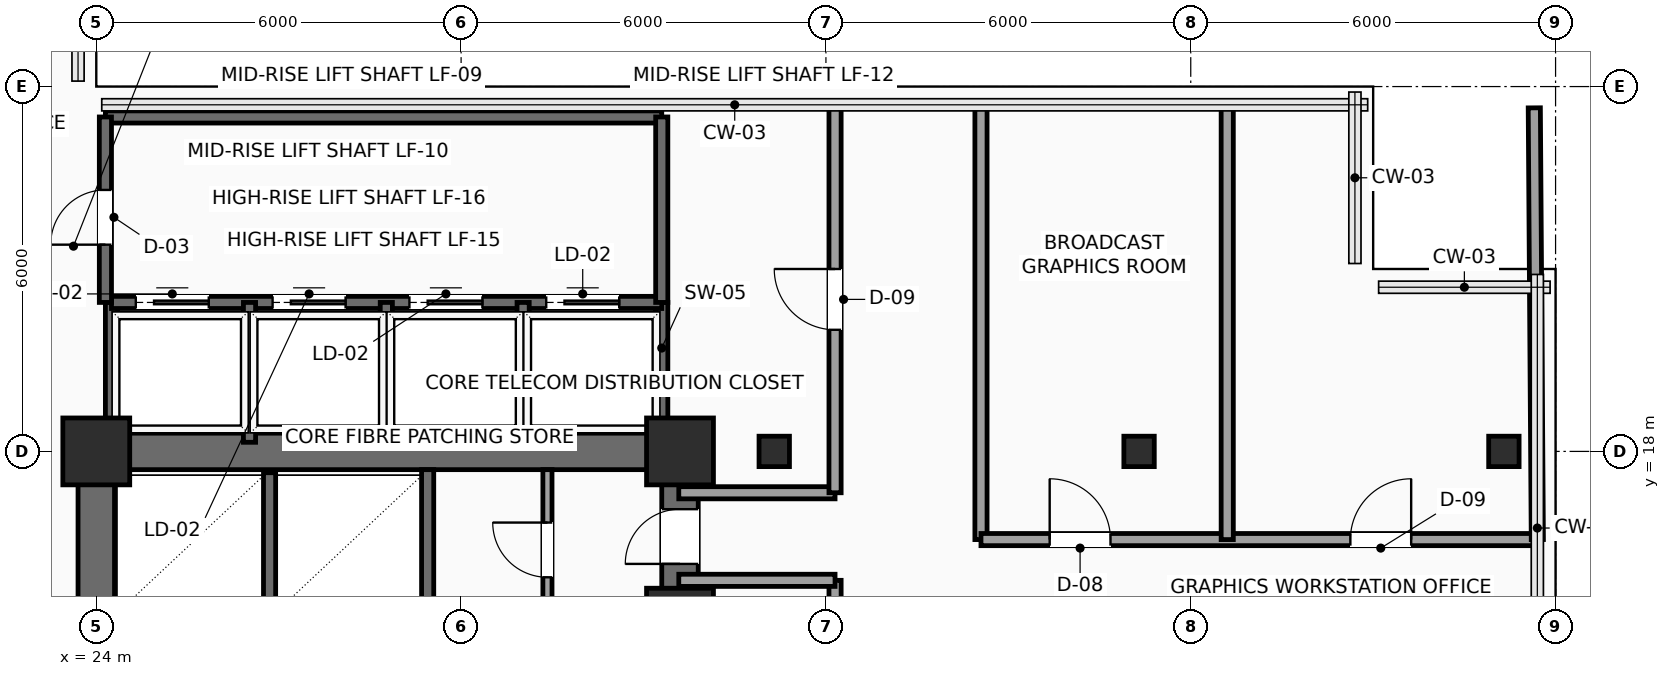
"""IFC4 building model, lengths in metres.
Left out: names, types, materials, properties, quantities, classifications, styles, units other than length and angle.
Written with IfcOpenShell. Run it as: python <this file> out.ifc"""

import sys

from ifc_helpers import new_model, si_unit, direction, frame, frame_2d, origin, origin_2d, place, context, subcontext, project, spatial, rectangle, hollow_rectangle, extrude, element, fill, save


model = new_model("IFC4")
c1 = context("Model", 3, precision=1e-05, world=origin(), true_north=direction((0.0, 1.0)))
c2 = subcontext(c1, "Body", "Model", "MODEL_VIEW")
j1 = project(units=[si_unit("LENGTHUNIT", "METRE"), si_unit("PLANEANGLEUNIT", "RADIAN")], contexts=[c1])
p1 = place(None, origin())
s1 = spatial("IfcSite", under=j1, at=p1, CompositionType="ELEMENT")
p2 = place(p1, origin())
s2 = spatial("IfcBuilding", under=s1, at=p2, CompositionType="ELEMENT")
p3 = place(p2, frame((0.0, 0.0, 123.15)))
s3 = spatial("IfcBuildingStorey", under=s2, at=p3, CompositionType="ELEMENT", Elevation=123.15)
for number, where, z_axis, x_axis in (
    (1, (24.0, 18.0, 0.0), (0.0, 0.0, 1.0), (1.0, 0.0, 0.0)),
    (2, (33.6, 15.2, 0.0), (0.0, 0.0, 1.0), (1.0, 0.0, 0.0)),
    (3, (33.6, 18.0, 0.0), (0.0, 0.0, 1.0), (1.0, 0.0, 0.0)),
):
    element("IfcColumn", number, at=place(p3, frame(where, z_axis=z_axis, x_axis=x_axis)), inside=s3, PredefinedType="COLUMN", context=c2, shape_type="SweptSolid", body=[
        extrude(rectangle(XDim=1.1, YDim=1.1, at=origin_2d()), origin(), (0.0, 0.0, 1.0), 3.75),
    ])
for number, where, z_axis, x_axis in (
    (4, (35.15, 18.0, 0.0), (0.0, 0.0, 1.0), (1.0, 0.0, 0.0)),
    (5, (41.15, 18.0, 0.0), (0.0, 0.0, 1.0), (1.0, 0.0, 0.0)),
    (6, (47.15, 18.0, 0.0), (0.0, 0.0, 1.0), (1.0, 0.0, 0.0)),
):
    element("IfcColumn", number, at=place(p3, frame(where, z_axis=z_axis, x_axis=x_axis)), inside=s3, PredefinedType="COLUMN", context=c2, shape_type="SweptSolid", body=[
        extrude(hollow_rectangle(XDim=0.5, YDim=0.5, WallThickness=0.025, InnerFilletRadius=0.025, OuterFilletRadius=0.04, at=origin_2d()), origin(), (0.0, 0.0, 1.0), 3.75),
    ])
p4 = place(p3, frame((24.0, 18.0, 0.0), z_axis=(0.0, 0.0, 1.0), x_axis=(1.0, 0.0, 0.0)))
e7 = element("IfcWall", 7, at=p4, inside=s3, PredefinedType="SHEAR", context=c2, shape_type="SweptSolid", body=[
    extrude(rectangle(XDim=9.6, YDim=0.6, at=frame_2d((4.8, 0.0))), origin(), (0.0, 0.0, 1.0), 3.525),
])
p5 = place(p3, frame((24.0, 6.0, 0.0), z_axis=(0.0, 0.0, 1.0), x_axis=(0.0, 1.0, 0.0)))
e8 = element("IfcWall", 8, at=p5, inside=s3, PredefinedType="SHEAR", context=c2, shape_type="SweptSolid", body=[
    extrude(rectangle(XDim=12.0, YDim=0.6, at=frame_2d((6.0, 0.0))), origin(), (0.0, 0.0, 1.0), 3.525),
])
p6 = place(p5, frame((7.15, 0.0, 0.0)))
e9 = element("IfcOpeningElement", 9, at=p6, cuts=e8, PredefinedType="OPENING", context=c2, shape_type="SweptSolid", body=[
    extrude(rectangle(XDim=1.6, YDim=2.3, at=frame_2d((0.8, 1.15))), frame((0.0, 0.31, 0.0), z_axis=(0.0, -1.0, 0.0), x_axis=(1.0, 0.0, 0.0)), (0.0, 0.0, 1.0), 0.62),
])
p7 = place(p3, frame((33.6, 6.0, 0.0), z_axis=(0.0, 0.0, 1.0), x_axis=(0.0, 1.0, 0.0)))
e10 = element("IfcWall", 10, at=p7, inside=s3, PredefinedType="SHEAR", context=c2, shape_type="SweptSolid", body=[
    extrude(rectangle(XDim=12.0, YDim=0.6, at=frame_2d((6.0, 0.0))), origin(), (0.0, 0.0, 1.0), 3.525),
])
p8 = place(p7, frame((10.15, 0.0, 0.0)))
e11 = element("IfcOpeningElement", 11, at=p8, cuts=e10, PredefinedType="OPENING", context=c2, shape_type="SweptSolid", body=[
    extrude(rectangle(XDim=0.9, YDim=2.15, at=frame_2d((0.45, 1.075))), frame((0.0, 0.31, 0.0), z_axis=(0.0, -1.0, 0.0), x_axis=(1.0, 0.0, 0.0)), (0.0, 0.0, 1.0), 0.62),
])
p9 = place(p3, frame((26.85, 15.25, 0.0), z_axis=(0.0, 0.0, 1.0), x_axis=(0.0, 1.0, 0.0)))
e12 = element("IfcWall", 12, at=p9, inside=s3, PredefinedType="SHEAR", context=c2, shape_type="SweptSolid", body=[
    extrude(rectangle(XDim=2.4, YDim=0.2, at=frame_2d((1.2, 0.0))), origin(), (0.0, 0.0, 1.0), 3.525),
])
p10 = place(p3, frame((29.45, 15.25, 0.0), z_axis=(0.0, 0.0, 1.0), x_axis=(0.0, 1.0, 0.0)))
e13 = element("IfcWall", 13, at=p10, inside=s3, PredefinedType="SHEAR", context=c2, shape_type="SweptSolid", body=[
    extrude(rectangle(XDim=2.45, YDim=0.2, at=frame_2d((1.225, 0.0))), origin(), (0.0, 0.0, 1.0), 3.525),
])
p11 = place(p3, frame((31.42, 15.28, 0.0), z_axis=(0.0, 0.0, 1.0), x_axis=(0.0, 1.0, 0.0)))
e14 = element("IfcWall", 14, at=p11, inside=s3, PredefinedType="PARTITIONING", context=c2, shape_type="SweptSolid", body=[
    extrude(rectangle(XDim=2.42, YDim=0.15, at=frame_2d((1.21, 0.0))), origin(), (0.0, 0.0, 1.0), 3.525),
])
p12 = place(p11, frame((0.65, 0.0, 0.0)))
e15 = element("IfcOpeningElement", 15, at=p12, cuts=e14, PredefinedType="OPENING", context=c2, shape_type="SweptSolid", body=[
    extrude(rectangle(XDim=0.9, YDim=2.15, at=frame_2d((0.45, 1.075))), frame((0.0, 0.085, 0.0), z_axis=(0.0, -1.0, 0.0), x_axis=(1.0, 0.0, 0.0)), (0.0, 0.0, 1.0), 0.17),
])
for number, where, z_axis, x_axis in (
    (16, (33.3, 18.1, 0.0), (0.0, 0.0, 1.0), (0.0, 1.0, 0.0)),
    (17, (24.25, 18.1, 0.0), (0.0, 0.0, 1.0), (0.0, 1.0, 0.0)),
):
    element("IfcWall", number, at=place(p3, frame(where, z_axis=z_axis, x_axis=x_axis)), inside=s3, PredefinedType="SHEAR", context=c2, shape_type="SweptSolid", body=[
        extrude(rectangle(XDim=2.35, YDim=0.2, at=frame_2d((1.175, 0.0))), origin(), (0.0, 0.0, 1.0), 3.525),
    ])
p13 = place(p3, frame((24.25, 20.45, 0.0), z_axis=(0.0, 0.0, 1.0), x_axis=(1.0, 0.0, 0.0)))
e18 = element("IfcWall", 18, at=p13, inside=s3, PredefinedType="SHEAR", context=c2, shape_type="SweptSolid", body=[
    extrude(rectangle(XDim=9.05, YDim=0.2, at=frame_2d((4.525, 0.0))), origin(), (0.0, 0.0, 1.0), 3.525),
])
p14 = place(p13, frame((0.4, 0.0, 0.0)))
e19 = element("IfcOpeningElement", 19, at=p14, cuts=e18, PredefinedType="OPENING", context=c2, shape_type="SweptSolid", body=[
    extrude(rectangle(XDim=1.2, YDim=2.2, at=frame_2d((0.6, 1.1))), frame((0.0, 0.11, 0.0), z_axis=(0.0, -1.0, 0.0), x_axis=(1.0, 0.0, 0.0)), (0.0, 0.0, 1.0), 0.22),
])
p15 = place(p13, frame((2.65, 0.0, 0.0)))
e20 = element("IfcOpeningElement", 20, at=p15, cuts=e18, PredefinedType="OPENING", context=c2, shape_type="SweptSolid", body=[
    extrude(rectangle(XDim=1.2, YDim=2.2, at=frame_2d((0.6, 1.1))), frame((0.0, 0.11, 0.0), z_axis=(0.0, -1.0, 0.0), x_axis=(1.0, 0.0, 0.0)), (0.0, 0.0, 1.0), 0.22),
])
p16 = place(p13, frame((4.9, 0.0, 0.0)))
e21 = element("IfcOpeningElement", 21, at=p16, cuts=e18, PredefinedType="OPENING", context=c2, shape_type="SweptSolid", body=[
    extrude(rectangle(XDim=1.2, YDim=2.2, at=frame_2d((0.6, 1.1))), frame((0.0, 0.11, 0.0), z_axis=(0.0, -1.0, 0.0), x_axis=(1.0, 0.0, 0.0)), (0.0, 0.0, 1.0), 0.22),
])
p17 = place(p13, frame((7.15, 0.0, 0.0)))
e22 = element("IfcOpeningElement", 22, at=p17, cuts=e18, PredefinedType="OPENING", context=c2, shape_type="SweptSolid", body=[
    extrude(rectangle(XDim=1.2, YDim=2.2, at=frame_2d((0.6, 1.1))), frame((0.0, 0.11, 0.0), z_axis=(0.0, -1.0, 0.0), x_axis=(1.0, 0.0, 0.0)), (0.0, 0.0, 1.0), 0.22),
])
for number, where, z_axis, x_axis in (
    (23, (26.52, 18.15, 0.0), (0.0, 0.0, 1.0), (0.0, 1.0, 0.0)),
    (24, (28.77, 18.15, 0.0), (0.0, 0.0, 1.0), (0.0, 1.0, 0.0)),
    (25, (31.02, 18.15, 0.0), (0.0, 0.0, 1.0), (0.0, 1.0, 0.0)),
):
    element("IfcWall", number, at=place(p3, frame(where, z_axis=z_axis, x_axis=x_axis)), inside=s3, PredefinedType="SHEAR", context=c2, shape_type="SweptSolid", body=[
        extrude(rectangle(XDim=2.3, YDim=0.2, at=frame_2d((1.15, 0.0))), origin(), (0.0, 0.0, 1.0), 3.525),
    ])
p18 = place(p3, frame((24.15, 23.5, 0.0), z_axis=(0.0, 0.0, 1.0), x_axis=(1.0, 0.0, 0.0)))
e26 = element("IfcWall", 26, at=p18, inside=s3, PredefinedType="SHEAR", context=c2, shape_type="SweptSolid", body=[
    extrude(rectangle(XDim=9.15, YDim=0.2, at=frame_2d((4.575, 0.0))), origin(), (0.0, 0.0, 1.0), 3.525),
])
p19 = place(p3, frame((33.3, 20.45, 0.0), z_axis=(0.0, 0.0, 1.0), x_axis=(0.0, 1.0, 0.0)))
e27 = element("IfcWall", 27, at=p19, inside=s3, PredefinedType="SHEAR", context=c2, shape_type="SweptSolid", body=[
    extrude(rectangle(XDim=3.05, YDim=0.2, at=frame_2d((1.525, 0.0))), origin(), (0.0, 0.0, 1.0), 3.525),
])
p20 = place(p3, frame((24.15, 20.45, 0.0), z_axis=(0.0, 0.0, 1.0), x_axis=(0.0, 1.0, 0.0)))
e28 = element("IfcWall", 28, at=p20, inside=s3, PredefinedType="SHEAR", context=c2, shape_type="SweptSolid", body=[
    extrude(rectangle(XDim=3.05, YDim=0.2, at=frame_2d((1.525, 0.0))), origin(), (0.0, 0.0, 1.0), 3.525),
])
p21 = place(p20, frame((0.95, 0.0, 0.0)))
e29 = element("IfcOpeningElement", 29, at=p21, cuts=e28, PredefinedType="OPENING", context=c2, shape_type="SweptSolid", body=[
    extrude(rectangle(XDim=0.9, YDim=2.15, at=frame_2d((0.45, 1.075))), frame((0.0, 0.11, 0.0), z_axis=(0.0, -1.0, 0.0), x_axis=(1.0, 0.0, 0.0)), (0.0, 0.0, 1.0), 0.22),
])
p22 = place(p3, frame((36.15, 5.8, 0.0), z_axis=(0.0, 0.0, 1.0), x_axis=(0.0, 1.0, 0.0)))
e30 = element("IfcWall", 30, at=p22, inside=s3, PredefinedType="SOLIDWALL", context=c2, shape_type="SweptSolid", body=[
    extrude(rectangle(XDim=10.08, YDim=0.2, at=frame_2d((5.04, 0.0))), origin(), (0.0, 0.0, 1.0), 3.525),
])
p23 = place(p22, frame((2.0, 0.0, 0.0)))
e31 = element("IfcOpeningElement", 31, at=p23, cuts=e30, PredefinedType="OPENING", context=c2, shape_type="SweptSolid", body=[
    extrude(rectangle(XDim=1.0, YDim=2.2, at=frame_2d((0.5, 1.1))), frame((0.0, 0.11, 0.0), z_axis=(0.0, -1.0, 0.0), x_axis=(1.0, 0.0, 0.0)), (0.0, 0.0, 1.0), 0.22),
])
p24 = place(p22, frame((7.04, 0.0, 0.0)))
e32 = element("IfcOpeningElement", 32, at=p24, cuts=e30, PredefinedType="OPENING", context=c2, shape_type="SweptSolid", body=[
    extrude(rectangle(XDim=1.0, YDim=2.2, at=frame_2d((0.5, 1.1))), frame((0.0, 0.11, 0.0), z_axis=(0.0, -1.0, 0.0), x_axis=(1.0, 0.0, 0.0)), (0.0, 0.0, 1.0), 0.22),
])
for number, where, z_axis, x_axis in (
    (33, (36.15, 15.88, 0.0), (0.0, 0.0, 1.0), (-1.0, 0.0, 0.0)),
    (34, (33.58, 17.32, 0.0), (0.0, 0.0, 1.0), (1.0, 0.0, 0.0)),
):
    element("IfcWall", number, at=place(p3, frame(where, z_axis=z_axis, x_axis=x_axis)), inside=s3, PredefinedType="SOLIDWALL", context=c2, shape_type="SweptSolid", body=[
        extrude(rectangle(XDim=2.57, YDim=0.2, at=frame_2d((1.285, 0.0))), origin(), (0.0, 0.0, 1.0), 3.525),
    ])
p25 = place(p3, frame((36.15, 17.32, 0.0), z_axis=(0.0, 0.0, 1.0), x_axis=(0.0, 1.0, 0.0)))
e35 = element("IfcWall", 35, at=p25, inside=s3, PredefinedType="SOLIDWALL", context=c2, shape_type="SweptSolid", body=[
    extrude(rectangle(XDim=6.38, YDim=0.2, at=frame_2d((3.19, 0.0))), origin(), (0.0, 0.0, 1.0), 3.525),
])
p26 = place(p25, frame((2.68, 0.0, 0.0)))
e36 = element("IfcOpeningElement", 36, at=p26, cuts=e35, PredefinedType="OPENING", context=c2, shape_type="SweptSolid", body=[
    extrude(rectangle(XDim=1.0, YDim=2.2, at=frame_2d((0.5, 1.1))), frame((0.0, 0.11, 0.0), z_axis=(0.0, -1.0, 0.0), x_axis=(1.0, 0.0, 0.0)), (0.0, 0.0, 1.0), 0.22),
])
p27 = place(p3, frame((38.55, 23.7, 0.0), z_axis=(0.0, 0.0, 1.0), x_axis=(0.0, -1.0, 0.0)))
e37 = element("IfcWall", 37, at=p27, inside=s3, PredefinedType="SOLIDWALL", context=c2, shape_type="SweptSolid", body=[
    extrude(rectangle(XDim=7.15, YDim=0.2, at=frame_2d((3.575, 0.0))), origin(), (0.0, 0.0, 1.0), 3.525),
])
p28 = place(p3, frame((38.55, 16.55, 0.0), z_axis=(0.0, 0.0, 1.0), x_axis=(1.0, 0.0, 0.0)))
e38 = element("IfcWall", 38, at=p28, inside=s3, PredefinedType="SOLIDWALL", context=c2, shape_type="SweptSolid", body=[
    extrude(rectangle(XDim=9.15, YDim=0.2, at=frame_2d((4.575, 0.0))), origin(), (0.0, 0.0, 1.0), 3.525),
])
p29 = place(p28, frame((1.13, 0.0, 0.0)))
e39 = element("IfcOpeningElement", 39, at=p29, cuts=e38, PredefinedType="OPENING", context=c2, shape_type="SweptSolid", body=[
    extrude(rectangle(XDim=1.0, YDim=2.2, at=frame_2d((0.5, 1.1))), frame((0.0, 0.11, 0.0), z_axis=(0.0, -1.0, 0.0), x_axis=(1.0, 0.0, 0.0)), (0.0, 0.0, 1.0), 0.22),
])
p30 = place(p28, frame((6.075, 0.0, 0.0)))
e40 = element("IfcOpeningElement", 40, at=p30, cuts=e38, PredefinedType="OPENING", context=c2, shape_type="SweptSolid", body=[
    extrude(rectangle(XDim=1.0, YDim=2.2, at=frame_2d((0.5, 1.1))), frame((0.0, 0.11, 0.0), z_axis=(0.0, -1.0, 0.0), x_axis=(1.0, 0.0, 0.0)), (0.0, 0.0, 1.0), 0.22),
])
p31 = place(p3, frame((42.6, 16.55, 0.0), z_axis=(0.0, 0.0, 1.0), x_axis=(0.0, 1.0, 0.0)))
e41 = element("IfcWall", 41, at=p31, inside=s3, PredefinedType="PARTITIONING", context=c2, shape_type="SweptSolid", body=[
    extrude(rectangle(XDim=7.15, YDim=0.2, at=frame_2d((3.575, 0.0))), origin(), (0.0, 0.0, 1.0), 3.525),
])
p32 = place(p3, frame((47.7, 16.55, 0.0), z_axis=(0.0, 0.0, 1.0), x_axis=(-0.007049101019, 0.999975154779, 0.0)))
e42 = element("IfcWall", 42, at=p32, inside=s3, PredefinedType="PARTITIONING", context=c2, shape_type="SweptSolid", body=[
    extrude(rectangle(XDim=7.1, YDim=0.2, at=frame_2d((3.55, 0.0))), origin(), (0.0, 0.0, 1.0), 3.525),
])
p33 = place(p8, origin())
e43 = element("IfcDoor", 43, at=p33, inside=s3, OperationType="SINGLE_SWING_LEFT", PredefinedType="DOOR", context=c2, shape_type="SweptSolid", body=[
    extrude(rectangle(XDim=0.9, YDim=2.15, at=frame_2d((0.45, 1.075))), frame((0.0, 0.025, 0.0), z_axis=(0.0, -1.0, 0.0), x_axis=(1.0, 0.0, 0.0)), (0.0, 0.0, 1.0), 0.05),
])
fill(e11, e43)
p34 = place(p12, origin())
e44 = element("IfcDoor", 44, at=p34, inside=s3, OperationType="SINGLE_SWING_RIGHT", PredefinedType="DOOR", context=c2, shape_type="SweptSolid", body=[
    extrude(rectangle(XDim=0.9, YDim=2.15, at=frame_2d((0.45, 1.075))), frame((0.0, 0.025, 0.0), z_axis=(0.0, -1.0, 0.0), x_axis=(1.0, 0.0, 0.0)), (0.0, 0.0, 1.0), 0.05),
])
fill(e15, e44)
p35 = place(p14, origin())
e45 = element("IfcDoor", 45, at=p35, inside=s3, OperationType="SLIDING_TO_RIGHT", PredefinedType="DOOR", context=c2, shape_type="SweptSolid", body=[
    extrude(rectangle(XDim=1.2, YDim=2.2, at=frame_2d((0.6, 1.1))), frame((0.0, 0.025, 0.0), z_axis=(0.0, -1.0, 0.0), x_axis=(1.0, 0.0, 0.0)), (0.0, 0.0, 1.0), 0.05),
])
fill(e19, e45)
p36 = place(p15, origin())
e46 = element("IfcDoor", 46, at=p36, inside=s3, OperationType="SLIDING_TO_RIGHT", PredefinedType="DOOR", context=c2, shape_type="SweptSolid", body=[
    extrude(rectangle(XDim=1.2, YDim=2.2, at=frame_2d((0.6, 1.1))), frame((0.0, 0.025, 0.0), z_axis=(0.0, -1.0, 0.0), x_axis=(1.0, 0.0, 0.0)), (0.0, 0.0, 1.0), 0.05),
])
fill(e20, e46)
p37 = place(p16, origin())
e47 = element("IfcDoor", 47, at=p37, inside=s3, OperationType="SLIDING_TO_RIGHT", PredefinedType="DOOR", context=c2, shape_type="SweptSolid", body=[
    extrude(rectangle(XDim=1.2, YDim=2.2, at=frame_2d((0.6, 1.1))), frame((0.0, 0.025, 0.0), z_axis=(0.0, -1.0, 0.0), x_axis=(1.0, 0.0, 0.0)), (0.0, 0.0, 1.0), 0.05),
])
fill(e21, e47)
p38 = place(p17, origin())
e48 = element("IfcDoor", 48, at=p38, inside=s3, OperationType="SLIDING_TO_RIGHT", PredefinedType="DOOR", context=c2, shape_type="SweptSolid", body=[
    extrude(rectangle(XDim=1.2, YDim=2.2, at=frame_2d((0.6, 1.1))), frame((0.0, 0.025, 0.0), z_axis=(0.0, -1.0, 0.0), x_axis=(1.0, 0.0, 0.0)), (0.0, 0.0, 1.0), 0.05),
])
fill(e22, e48)
p39 = place(p21, origin())
e49 = element("IfcDoor", 49, at=p39, inside=s3, OperationType="SINGLE_SWING_LEFT", PredefinedType="DOOR", context=c2, shape_type="SweptSolid", body=[
    extrude(rectangle(XDim=0.9, YDim=2.15, at=frame_2d((0.45, 1.075))), frame((0.0, 0.025, 0.0), z_axis=(0.0, -1.0, 0.0), x_axis=(1.0, 0.0, 0.0)), (0.0, 0.0, 1.0), 0.05),
])
fill(e29, e49)
p40 = place(p26, origin())
e50 = element("IfcDoor", 50, at=p40, inside=s3, OperationType="SINGLE_SWING_RIGHT", PredefinedType="DOOR", context=c2, shape_type="SweptSolid", body=[
    extrude(rectangle(XDim=1.0, YDim=2.2, at=frame_2d((0.5, 1.1))), frame((0.0, 0.025, 0.0), z_axis=(0.0, -1.0, 0.0), x_axis=(1.0, 0.0, 0.0)), (0.0, 0.0, 1.0), 0.05),
])
fill(e36, e50)
p41 = place(p29, origin())
e51 = element("IfcDoor", 51, at=p41, inside=s3, OperationType="SINGLE_SWING_LEFT", PredefinedType="DOOR", context=c2, shape_type="SweptSolid", body=[
    extrude(rectangle(XDim=1.0, YDim=2.2, at=frame_2d((0.5, 1.1))), frame((0.0, 0.025, 0.0), z_axis=(0.0, -1.0, 0.0), x_axis=(1.0, 0.0, 0.0)), (0.0, 0.0, 1.0), 0.05),
])
fill(e39, e51)
p42 = place(p30, origin())
e52 = element("IfcDoor", 52, at=p42, inside=s3, OperationType="SINGLE_SWING_RIGHT", PredefinedType="DOOR", context=c2, shape_type="SweptSolid", body=[
    extrude(rectangle(XDim=1.0, YDim=2.2, at=frame_2d((0.5, 1.1))), frame((0.0, 0.025, 0.0), z_axis=(0.0, -1.0, 0.0), x_axis=(1.0, 0.0, 0.0)), (0.0, 0.0, 1.0), 0.05),
])
fill(e40, e52)
save(model, sys.argv[1])
